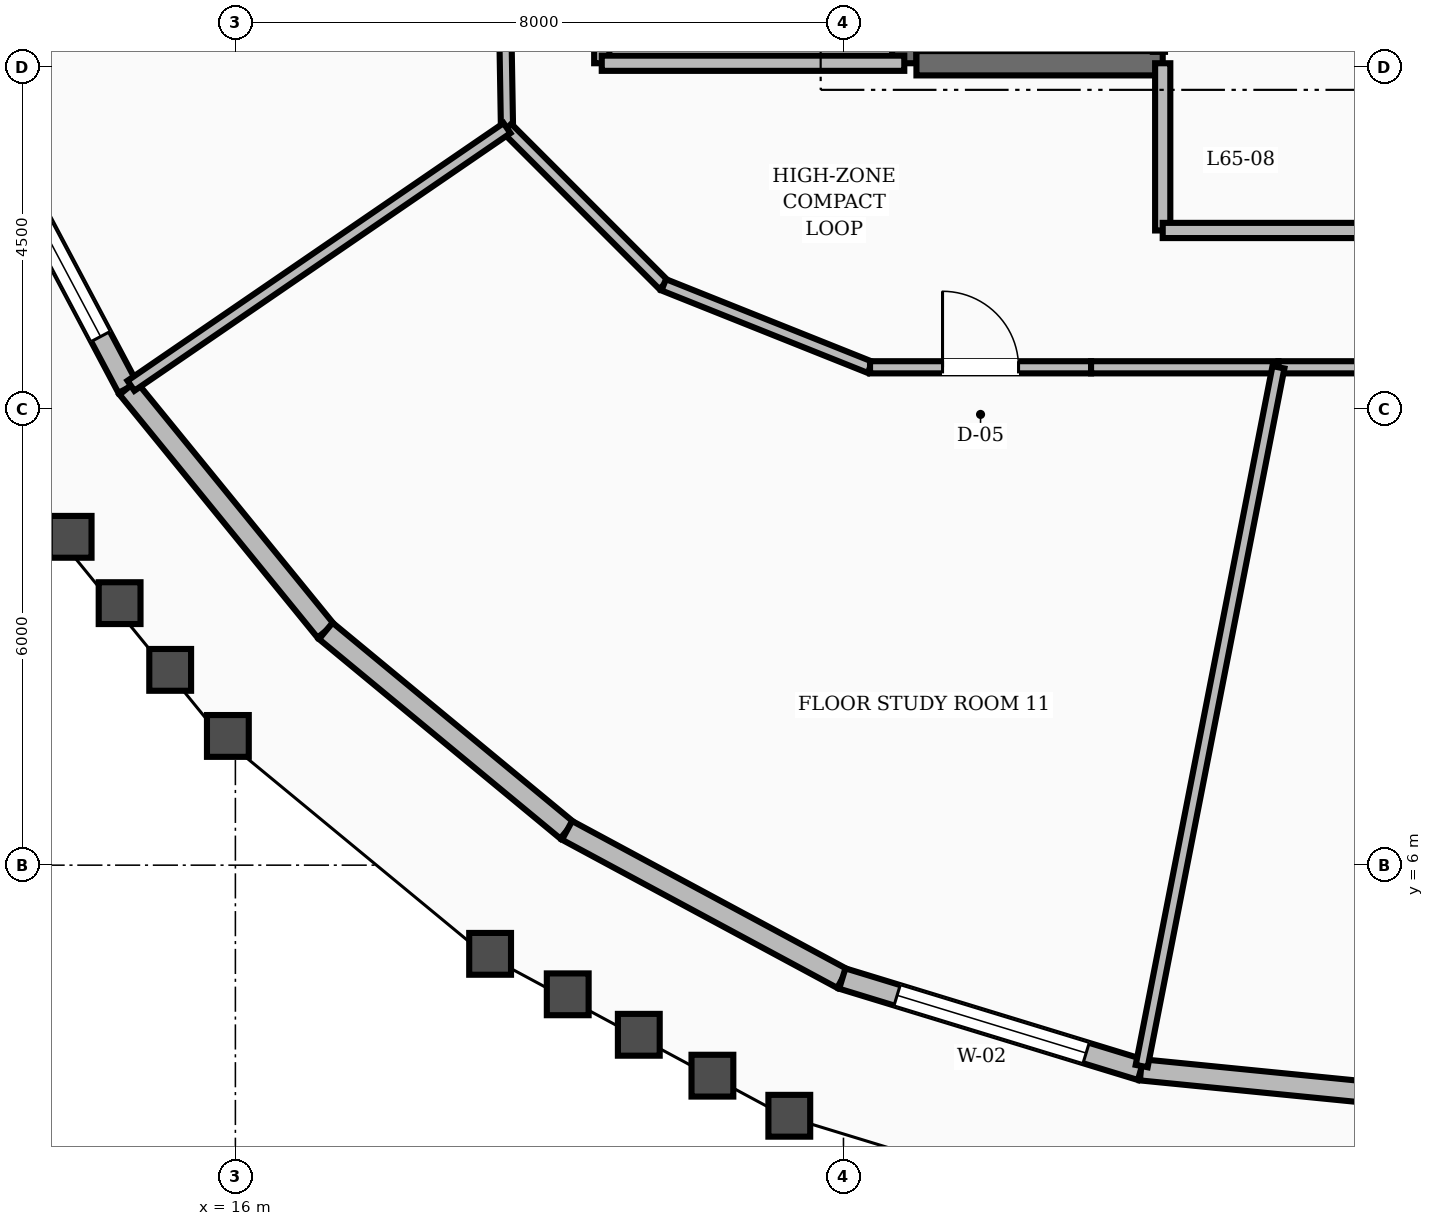
"""IFC4 building model, lengths in metres.
Left out: names, types, materials, properties, quantities, classifications, styles, units other than length and angle.
Written with IfcOpenShell. Run it as: python <this file> out.ifc"""

import sys

from ifc_helpers import new_model, si_unit, direction, frame, frame_2d, origin, place, context, subcontext, project, spatial, rectangle, extrude, element, fill, save


model = new_model("IFC4")
c1 = context("Model", 3, precision=1e-05, world=origin(), true_north=direction((0.0, 1.0)))
c2 = subcontext(c1, "Body", "Model", "MODEL_VIEW")
j1 = project(units=[si_unit("LENGTHUNIT", "METRE"), si_unit("PLANEANGLEUNIT", "RADIAN")], contexts=[c1])
p1 = place(None, origin())
s1 = spatial("IfcSite", under=j1, at=p1, CompositionType="ELEMENT")
p2 = place(p1, origin())
s2 = spatial("IfcBuilding", under=s1, at=p2, CompositionType="ELEMENT")
p3 = place(p2, frame((0.0, 0.0, 250.8)))
s3 = spatial("IfcBuildingStorey", under=s2, at=p3, CompositionType="ELEMENT", Elevation=250.8)
p4 = place(p3, frame((24.8, 16.55, 0.0), z_axis=(0.0, 0.0, 1.0), x_axis=(0.0, 1.0, 0.0)))
e1 = element("IfcWall", 1, at=p4, inside=s3, PredefinedType="SHEAR", context=c2, shape_type="SweptSolid", body=[
    extrude(rectangle(XDim=6.3, YDim=0.32, at=frame_2d((3.15, 0.0))), origin(), (0.0, 0.0, 1.0), 3.6),
])
p5 = place(p3, frame((24.96, 16.55, 0.0), z_axis=(0.0, 0.0, 1.0), x_axis=(1.0, 0.0, 0.0)))
e2 = element("IfcWall", 2, at=p5, inside=s3, PredefinedType="SHEAR", context=c2, shape_type="SweptSolid", body=[
    extrude(rectangle(XDim=3.24, YDim=0.32, at=frame_2d((1.62, 0.0))), origin(), (0.0, 0.0, 1.0), 3.6),
])
p6 = place(p3, frame((12.649, 15.926, 0.0), z_axis=(0.0, 0.0, 1.0), x_axis=(0.468745936162, -0.883333033081, 0.0)))
e3 = element("IfcWall", 3, at=p6, inside=s3, PredefinedType="STANDARD", context=c2, shape_type="SweptSolid", body=[
    extrude(rectangle(XDim=4.129, YDim=0.28, at=frame_2d((2.064, 0.0))), origin(), (0.0, 0.0, 1.0), 2.88),
])
p7 = place(p6, frame((0.765, 0.0, 0.8)))
e4 = element("IfcOpeningElement", 4, at=p7, cuts=e3, PredefinedType="OPENING", context=c2, shape_type="SweptSolid", body=[
    extrude(rectangle(XDim=2.6, YDim=1.65, at=frame_2d((1.3, 0.825))), frame((0.0, 0.15, 0.0), z_axis=(0.0, -1.0, 0.0), x_axis=(1.0, 0.0, 0.0)), (0.0, 0.0, 1.0), 0.3),
])
p8 = place(p3, frame((14.585, 12.279, 0.0), z_axis=(0.0, 0.0, 1.0), x_axis=(0.631637370097, -0.775263976138, 0.0)))
e5 = element("IfcWall", 5, at=p8, inside=s3, PredefinedType="STANDARD", context=c2, shape_type="SweptSolid", body=[
    extrude(rectangle(XDim=4.124, YDim=0.28, at=frame_2d((2.062, 0.0))), origin(), (0.0, 0.0, 1.0), 2.88),
])
p9 = place(p3, frame((17.189, 9.082, 0.0), z_axis=(0.0, 0.0, 1.0), x_axis=(0.770756680857, -0.637129609197, 0.0)))
e6 = element("IfcWall", 6, at=p9, inside=s3, PredefinedType="STANDARD", context=c2, shape_type="SweptSolid", body=[
    extrude(rectangle(XDim=4.118, YDim=0.28, at=frame_2d((2.059, 0.0))), origin(), (0.0, 0.0, 1.0), 2.88),
])
p10 = place(p3, frame((20.364, 6.458, 0.0), z_axis=(0.0, 0.0, 1.0), x_axis=(0.880482536711, -0.474078582671, 0.0)))
e7 = element("IfcWall", 7, at=p10, inside=s3, PredefinedType="STANDARD", context=c2, shape_type="SweptSolid", body=[
    extrude(rectangle(XDim=4.113, YDim=0.28, at=frame_2d((2.056, 0.0))), origin(), (0.0, 0.0, 1.0), 2.88),
])
p11 = place(p3, frame((23.985, 4.508, 0.0), z_axis=(0.0, 0.0, 1.0), x_axis=(0.956361719018, -0.292185322009, 0.0)))
e8 = element("IfcWall", 8, at=p11, inside=s3, PredefinedType="STANDARD", context=c2, shape_type="SweptSolid", body=[
    extrude(rectangle(XDim=4.108, YDim=0.28, at=frame_2d((2.054, 0.0))), origin(), (0.0, 0.0, 1.0), 2.88),
])
p12 = place(p11, frame((0.754, 0.0, 0.8)))
e9 = element("IfcOpeningElement", 9, at=p12, cuts=e8, PredefinedType="OPENING", context=c2, shape_type="SweptSolid", body=[
    extrude(rectangle(XDim=2.6, YDim=1.65, at=frame_2d((1.3, 0.825))), frame((0.0, 0.15, 0.0), z_axis=(0.0, -1.0, 0.0), x_axis=(1.0, 0.0, 0.0)), (0.0, 0.0, 1.0), 0.3),
])
p13 = place(p3, frame((27.914, 3.308, 0.0), z_axis=(0.0, 0.0, 1.0), x_axis=(0.995111670603, -0.098756078441, 0.0)))
e10 = element("IfcWall", 10, at=p13, inside=s3, PredefinedType="STANDARD", context=c2, shape_type="SweptSolid", body=[
    extrude(rectangle(XDim=4.106, YDim=0.28, at=frame_2d((2.053, 0.0))), origin(), (0.0, 0.0, 1.0), 2.88),
])
p14 = place(p3, frame((20.82, 16.55, 0.0), z_axis=(0.0, 0.0, 1.0), x_axis=(0.0, 1.0, 0.0)))
e11 = element("IfcWall", 11, at=p14, inside=s3, PredefinedType="SOLIDWALL", context=c2, shape_type="SweptSolid", body=[
    extrude(rectangle(XDim=2.73, YDim=0.2, at=frame_2d((1.365, 0.0))), origin(), (0.0, 0.0, 1.0), 2.87),
])
p15 = place(p14, frame((0.815, 0.0, 0.0)))
e12 = element("IfcOpeningElement", 12, at=p15, cuts=e11, PredefinedType="OPENING", context=c2, shape_type="SweptSolid", body=[
    extrude(rectangle(XDim=1.1, YDim=2.1, at=frame_2d((0.55, 1.05))), frame((0.0, 0.11, 0.0), z_axis=(0.0, -1.0, 0.0), x_axis=(1.0, 0.0, 0.0)), (0.0, 0.0, 1.0), 0.22),
])
p16 = place(p3, frame((20.82, 16.55, 0.0), z_axis=(0.0, 0.0, 1.0), x_axis=(1.0, 0.0, 0.0)))
e13 = element("IfcWall", 13, at=p16, inside=s3, PredefinedType="SOLIDWALL", context=c2, shape_type="SweptSolid", body=[
    extrude(rectangle(XDim=3.98, YDim=0.2, at=frame_2d((1.99, 0.0))), origin(), (0.0, 0.0, 1.0), 2.87),
])
p17 = place(p3, frame((28.2, 14.35, 0.0), z_axis=(0.0, 0.0, 1.0), x_axis=(0.0, 1.0, 0.0)))
e14 = element("IfcWall", 14, at=p17, inside=s3, PredefinedType="SOLIDWALL", context=c2, shape_type="SweptSolid", body=[
    extrude(rectangle(XDim=2.2, YDim=0.2, at=frame_2d((1.1, 0.0))), origin(), (0.0, 0.0, 1.0), 2.87),
])
p18 = place(p3, frame((28.2, 14.35, 0.0), z_axis=(0.0, 0.0, 1.0), x_axis=(1.0, 0.0, 0.0)))
e15 = element("IfcWall", 15, at=p18, inside=s3, PredefinedType="SOLIDWALL", context=c2, shape_type="SweptSolid", body=[
    extrude(rectangle(XDim=7.6, YDim=0.2, at=frame_2d((3.8, 0.0))), origin(), (0.0, 0.0, 1.0), 2.87),
])
p19 = place(p18, frame((3.2, 0.0, 0.0)))
e16 = element("IfcOpeningElement", 16, at=p19, cuts=e15, PredefinedType="OPENING", context=c2, shape_type="SweptSolid", body=[
    extrude(rectangle(XDim=1.2, YDim=2.1, at=frame_2d((0.6, 1.05))), frame((0.0, 0.11, 0.0), z_axis=(0.0, -1.0, 0.0), x_axis=(1.0, 0.0, 0.0)), (0.0, 0.0, 1.0), 0.22),
])
p20 = place(p3, frame((19.52, 18.831, 0.0), z_axis=(0.0, 0.0, 1.0), x_axis=(0.016981035134, -0.999855811828, 0.0)))
e17 = element("IfcWall", 17, at=p20, inside=s3, PredefinedType="SOLIDWALL", context=c2, shape_type="SweptSolid", body=[
    extrude(rectangle(XDim=3.134, YDim=0.16, at=frame_2d((1.567, 0.0))), origin(), (0.0, 0.0, 1.0), 2.87),
])
p21 = place(p3, frame((19.573, 15.697, 0.0), z_axis=(0.0, 0.0, 1.0), x_axis=(0.707106781187, -0.707106781187, 0.0)))
e18 = element("IfcWall", 18, at=p21, inside=s3, PredefinedType="SOLIDWALL", context=c2, shape_type="SweptSolid", body=[
    extrude(rectangle(XDim=2.916, YDim=0.16, at=frame_2d((1.458, 0.0))), origin(), (0.0, 0.0, 1.0), 2.87),
])
p22 = place(p3, frame((21.635, 13.635, 0.0), z_axis=(0.0, 0.0, 1.0), x_axis=(0.92856882165, -0.371160266542, 0.0)))
e19 = element("IfcWall", 19, at=p22, inside=s3, PredefinedType="SOLIDWALL", context=c2, shape_type="SweptSolid", body=[
    extrude(rectangle(XDim=2.923, YDim=0.16, at=frame_2d((1.461, 0.0))), origin(), (0.0, 0.0, 1.0), 2.87),
])
p23 = place(p3, frame((24.349, 12.55, 0.0), z_axis=(0.0, 0.0, 1.0), x_axis=(1.0, 0.0, 0.0)))
e20 = element("IfcWall", 20, at=p23, inside=s3, PredefinedType="SOLIDWALL", context=c2, shape_type="SweptSolid", body=[
    extrude(rectangle(XDim=2.908, YDim=0.16, at=frame_2d((1.454, 0.0))), origin(), (0.0, 0.0, 1.0), 2.87),
])
p24 = place(p23, frame((0.954, 0.0, 0.0)))
e21 = element("IfcOpeningElement", 21, at=p24, cuts=e20, PredefinedType="OPENING", context=c2, shape_type="SweptSolid", body=[
    extrude(rectangle(XDim=1.0, YDim=2.1, at=frame_2d((0.5, 1.05))), frame((0.0, 0.09, 0.0), z_axis=(0.0, -1.0, 0.0), x_axis=(1.0, 0.0, 0.0)), (0.0, 0.0, 1.0), 0.18),
])
p25 = place(p3, frame((27.257, 12.55, 0.0), z_axis=(0.0, 0.0, 1.0), x_axis=(1.0, 0.0, 0.0)))
e22 = element("IfcWall", 22, at=p25, inside=s3, PredefinedType="SOLIDWALL", context=c2, shape_type="SweptSolid", body=[
    extrude(rectangle(XDim=2.465, YDim=0.16, at=frame_2d((1.232, 0.0))), origin(), (0.0, 0.0, 1.0), 2.87),
])
p26 = place(p3, frame((29.722, 12.55, 0.0), z_axis=(0.0, 0.0, 1.0), x_axis=(1.0, 0.0, 0.0)))
e23 = element("IfcWall", 23, at=p26, inside=s3, PredefinedType="SOLIDWALL", context=c2, shape_type="SweptSolid", body=[
    extrude(rectangle(XDim=2.278, YDim=0.16, at=frame_2d((1.139, 0.0))), origin(), (0.0, 0.0, 1.0), 2.87),
])
p27 = place(p3, frame((19.573, 15.697, 0.0), z_axis=(0.0, 0.0, 1.0), x_axis=(-0.824943620796, -0.56521502325, 0.0)))
e24 = element("IfcWall", 24, at=p27, inside=s3, PredefinedType="SOLIDWALL", context=c2, shape_type="SweptSolid", body=[
    extrude(rectangle(XDim=5.997, YDim=0.16, at=frame_2d((2.999, 0.0))), origin(), (0.0, 0.0, 1.0), 2.87),
])
p28 = place(p3, frame((29.722, 12.55, 0.0), z_axis=(0.0, 0.0, 1.0), x_axis=(-0.192054715532, -0.981384219479, 0.0)))
e25 = element("IfcWall", 25, at=p28, inside=s3, PredefinedType="SOLIDWALL", context=c2, shape_type="SweptSolid", body=[
    extrude(rectangle(XDim=9.367, YDim=0.16, at=frame_2d((4.684, 0.0))), origin(), (0.0, 0.0, 1.0), 2.87),
])
p29 = place(p7, origin())
e26 = element("IfcWindow", 26, at=p29, inside=s3, PartitioningType="SINGLE_PANEL", PredefinedType="WINDOW", context=c2, shape_type="SweptSolid", body=[
    extrude(rectangle(XDim=2.6, YDim=1.65, at=frame_2d((1.3, 0.825))), frame((0.0, 0.03, 0.0), z_axis=(0.0, -1.0, 0.0), x_axis=(1.0, 0.0, 0.0)), (0.0, 0.0, 1.0), 0.06),
])
fill(e4, e26)
p30 = place(p12, origin())
e27 = element("IfcWindow", 27, at=p30, inside=s3, PartitioningType="SINGLE_PANEL", PredefinedType="WINDOW", context=c2, shape_type="SweptSolid", body=[
    extrude(rectangle(XDim=2.6, YDim=1.65, at=frame_2d((1.3, 0.825))), frame((0.0, 0.03, 0.0), z_axis=(0.0, -1.0, 0.0), x_axis=(1.0, 0.0, 0.0)), (0.0, 0.0, 1.0), 0.06),
])
fill(e9, e27)
p31 = place(p24, origin())
e28 = element("IfcDoor", 28, at=p31, inside=s3, OperationType="SINGLE_SWING_LEFT", PredefinedType="DOOR", context=c2, shape_type="SweptSolid", body=[
    extrude(rectangle(XDim=1.0, YDim=2.1, at=frame_2d((0.5, 1.05))), frame((0.0, 0.025, 0.0), z_axis=(0.0, -1.0, 0.0), x_axis=(1.0, 0.0, 0.0)), (0.0, 0.0, 1.0), 0.05),
])
fill(e21, e28)
save(model, sys.argv[1])
